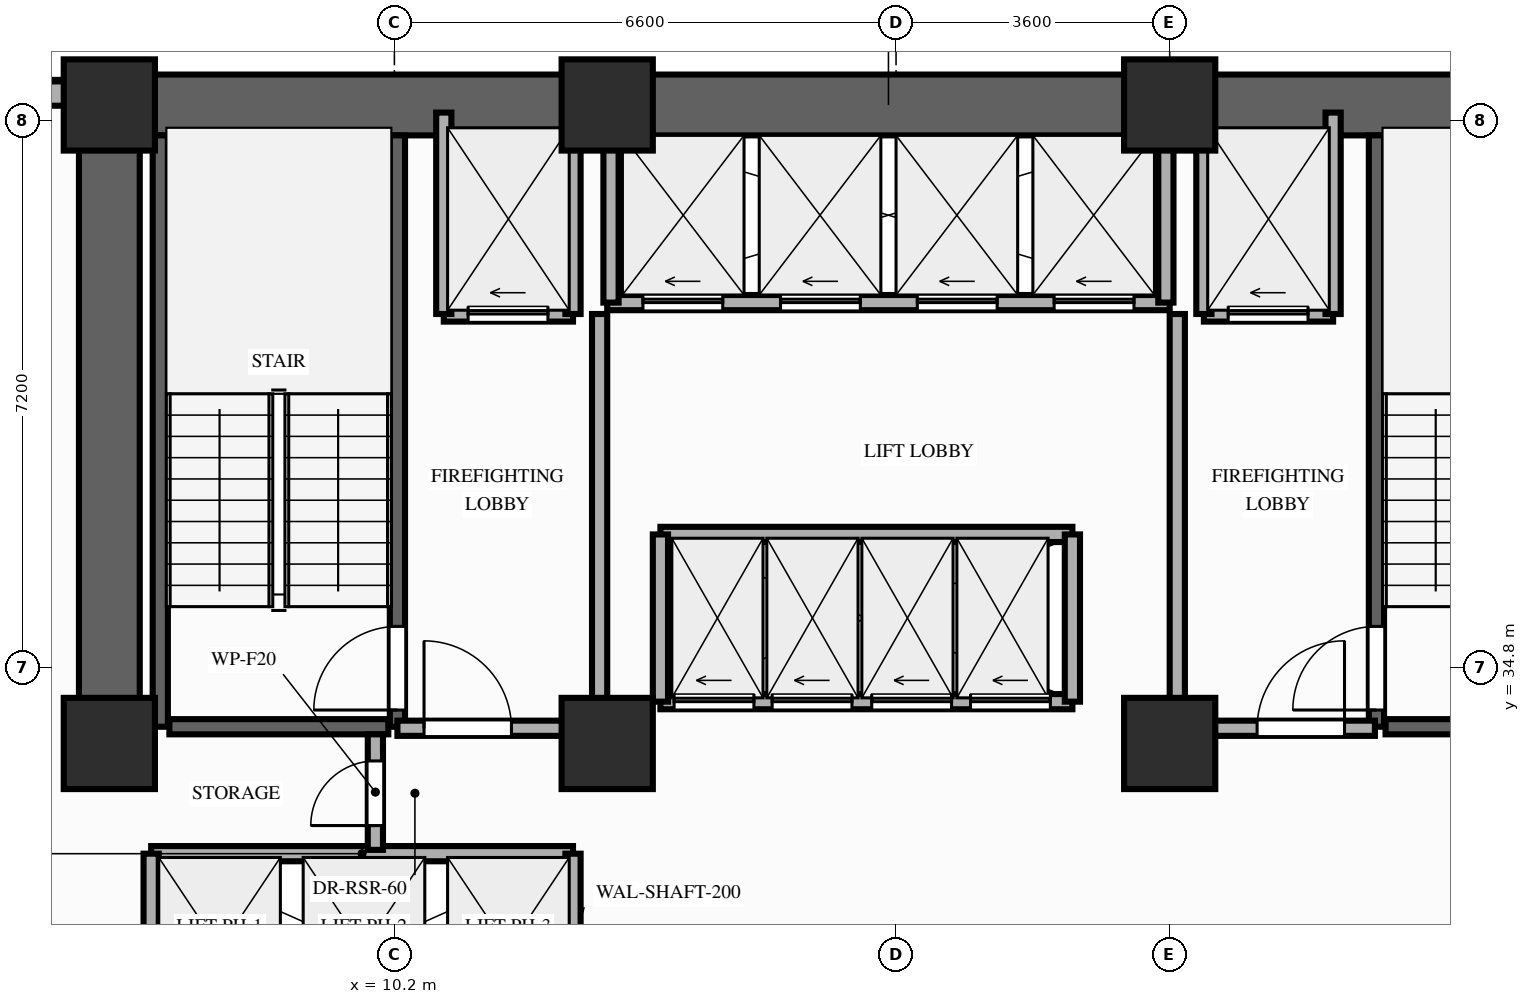
"""IFC4 building model, lengths in metres.
Left out: names, types, materials, properties, quantities, classifications, styles, units other than length and angle.
Written with IfcOpenShell. Run it as: python <this file> out.ifc"""

import sys

from ifc_helpers import new_model, si_unit, direction, frame, frame_2d, origin, origin_2d, place, context, subcontext, project, spatial, rectangle, extrude, element, fill, save


model = new_model("IFC4")
c1 = context("Model", 3, precision=1e-05, world=origin(), true_north=direction((0.0, 1.0)))
c2 = subcontext(c1, "Body", "Model", "MODEL_VIEW")
j1 = project(units=[si_unit("LENGTHUNIT", "METRE"), si_unit("PLANEANGLEUNIT", "RADIAN")], contexts=[c1])
p1 = place(None, origin())
s1 = spatial("IfcSite", under=j1, at=p1, CompositionType="ELEMENT")
p2 = place(p1, origin())
s2 = spatial("IfcBuilding", under=s1, at=p2, CompositionType="ELEMENT")
p3 = place(p2, frame((0.0, 0.0, 75.6)))
s3 = spatial("IfcBuildingStorey", under=s2, at=p3, CompositionType="ELEMENT", Elevation=75.6)
for number, where, z_axis, x_axis in (
    (1, (6.45, 33.8, 0.0), (0.0, 0.0, 1.0), (1.0, 0.0, 0.0)),
    (2, (13.0, 33.8, 0.0), (0.0, 0.0, 1.0), (1.0, 0.0, 0.0)),
    (3, (20.4, 33.8, 0.0), (0.0, 0.0, 1.0), (1.0, 0.0, 0.0)),
    (4, (6.45, 42.2, 0.0), (0.0, 0.0, 1.0), (1.0, 0.0, 0.0)),
    (5, (13.0, 42.2, 0.0), (0.0, 0.0, 1.0), (1.0, 0.0, 0.0)),
    (6, (20.4, 42.2, 0.0), (0.0, 0.0, 1.0), (1.0, 0.0, 0.0)),
):
    element("IfcColumn", number, at=place(p3, frame(where, z_axis=z_axis, x_axis=x_axis)), inside=s3, PredefinedType="COLUMN", context=c2, shape_type="SweptSolid", body=[
        extrude(rectangle(XDim=1.2, YDim=1.2, at=origin_2d()), origin(), (0.0, 0.0, 1.0), 3.8),
    ])
p4 = place(p3, frame((6.0, 42.35, 0.0), z_axis=(0.0, 0.0, 1.0), x_axis=(-1.0, 0.0, 0.0)))
e7 = element("IfcWall", 7, at=p4, inside=s3, PredefinedType="STANDARD", context=c2, shape_type="SweptSolid", body=[
    extrude(rectangle(XDim=2.0, YDim=0.32, at=frame_2d((1.0, 0.0))), origin(), (0.0, 0.0, 1.0), 3.56),
])
p5 = place(p3, frame((6.45, 42.2, 0.0), z_axis=(0.0, 0.0, 1.0), x_axis=(1.0, 0.0, 0.0)))
e8 = element("IfcWall", 8, at=p5, inside=s3, PredefinedType="SHEAR", context=c2, shape_type="SweptSolid", body=[
    extrude(rectangle(XDim=20.45, YDim=0.8, at=frame_2d((10.225, 0.0))), origin(), (0.0, 0.0, 1.0), 3.56),
])
p6 = place(p3, frame((6.45, 33.8, 0.0), z_axis=(0.0, 0.0, 1.0), x_axis=(0.0, 1.0, 0.0)))
e9 = element("IfcWall", 9, at=p6, inside=s3, PredefinedType="SHEAR", context=c2, shape_type="SweptSolid", body=[
    extrude(rectangle(XDim=7.95, YDim=0.8, at=frame_2d((3.975, 0.0))), origin(), (0.0, 0.0, 1.0), 3.56),
])
p7 = place(p3, frame((7.12, 34.02, 0.0), z_axis=(0.0, 0.0, 1.0), x_axis=(0.0, 1.0, 0.0)))
e10 = element("IfcWall", 10, at=p7, inside=s3, PredefinedType="SHEAR", context=c2, shape_type="SweptSolid", body=[
    extrude(rectangle(XDim=7.78, YDim=0.2, at=frame_2d((3.89, 0.0))), origin(), (0.0, 0.0, 1.0), 3.56),
])
p8 = place(p3, frame((10.24, 34.02, 0.0), z_axis=(0.0, 0.0, 1.0), x_axis=(0.0, 1.0, 0.0)))
e11 = element("IfcWall", 11, at=p8, inside=s3, PredefinedType="SHEAR", context=c2, shape_type="SweptSolid", body=[
    extrude(rectangle(XDim=7.78, YDim=0.2, at=frame_2d((3.89, 0.0))), origin(), (0.0, 0.0, 1.0), 3.56),
])
p9 = place(p8, frame((0.22, 0.0, 0.0)))
e12 = element("IfcOpeningElement", 12, at=p9, cuts=e11, PredefinedType="OPENING", context=c2, shape_type="SweptSolid", body=[
    extrude(rectangle(XDim=1.1, YDim=2.15, at=frame_2d((0.55, 1.075))), frame((0.0, 0.11, 0.0), z_axis=(0.0, -1.0, 0.0), x_axis=(1.0, 0.0, 0.0)), (0.0, 0.0, 1.0), 0.22),
])
p10 = place(p3, frame((7.24, 34.02, 0.0), z_axis=(0.0, 0.0, 1.0), x_axis=(1.0, 0.0, 0.0)))
e13 = element("IfcWall", 13, at=p10, inside=s3, PredefinedType="SHEAR", context=c2, shape_type="SweptSolid", body=[
    extrude(rectangle(XDim=2.88, YDim=0.2, at=frame_2d((1.44, 0.0))), origin(), (0.0, 0.0, 1.0), 3.56),
])
p11 = place(p3, frame((23.12, 34.02, 0.0), z_axis=(0.0, 0.0, 1.0), x_axis=(0.0, 1.0, 0.0)))
e14 = element("IfcWall", 14, at=p11, inside=s3, PredefinedType="SHEAR", context=c2, shape_type="SweptSolid", body=[
    extrude(rectangle(XDim=7.78, YDim=0.2, at=frame_2d((3.89, 0.0))), origin(), (0.0, 0.0, 1.0), 3.56),
])
p12 = place(p11, frame((0.22, 0.0, 0.0)))
e15 = element("IfcOpeningElement", 15, at=p12, cuts=e14, PredefinedType="OPENING", context=c2, shape_type="SweptSolid", body=[
    extrude(rectangle(XDim=1.1, YDim=2.15, at=frame_2d((0.55, 1.075))), frame((0.0, 0.11, 0.0), z_axis=(0.0, -1.0, 0.0), x_axis=(1.0, 0.0, 0.0)), (0.0, 0.0, 1.0), 0.22),
])
p13 = place(p3, frame((23.24, 34.02, 0.0), z_axis=(0.0, 0.0, 1.0), x_axis=(1.0, 0.0, 0.0)))
e16 = element("IfcWall", 16, at=p13, inside=s3, PredefinedType="SHEAR", context=c2, shape_type="SweptSolid", body=[
    extrude(rectangle(XDim=2.88, YDim=0.2, at=frame_2d((1.44, 0.0))), origin(), (0.0, 0.0, 1.0), 3.56),
])
p14 = place(p3, frame((7.0, 32.35, 0.0), z_axis=(0.0, 0.0, 1.0), x_axis=(1.0, 0.0, 0.0)))
e17 = element("IfcWall", 17, at=p14, inside=s3, PredefinedType="MOVABLE", context=c2, shape_type="SweptSolid", body=[
    extrude(rectangle(XDim=5.55, YDim=0.2, at=frame_2d((2.775, 0.0))), origin(), (0.0, 0.0, 1.0), 3.56),
])
for number, where, z_axis, x_axis in (
    (18, (7.0, 29.85, 0.0), (0.0, 0.0, 1.0), (0.0, 1.0, 0.0)),
    (19, (12.55, 29.85, 0.0), (0.0, 0.0, 1.0), (0.0, 1.0, 0.0)),
):
    element("IfcWall", number, at=place(p3, frame(where, z_axis=z_axis, x_axis=x_axis)), inside=s3, PredefinedType="MOVABLE", context=c2, shape_type="SweptSolid", body=[
        extrude(rectangle(XDim=2.5, YDim=0.2, at=frame_2d((1.25, 0.0))), origin(), (0.0, 0.0, 1.0), 3.56),
    ])
p15 = place(p3, frame((10.85, 39.45, 0.0), z_axis=(0.0, 0.0, 1.0), x_axis=(1.0, 0.0, 0.0)))
e20 = element("IfcWall", 20, at=p15, inside=s3, PredefinedType="MOVABLE", context=c2, shape_type="SweptSolid", body=[
    extrude(rectangle(XDim=1.7, YDim=0.2, at=frame_2d((0.85, 0.0))), origin(), (0.0, 0.0, 1.0), 3.56),
])
p16 = place(p15, frame((0.32, 0.0, 0.0)))
e21 = element("IfcOpeningElement", 21, at=p16, cuts=e20, PredefinedType="OPENING", context=c2, shape_type="SweptSolid", body=[
    extrude(rectangle(XDim=1.05, YDim=2.15, at=frame_2d((0.525, 1.075))), frame((0.0, 0.11, 0.0), z_axis=(0.0, -1.0, 0.0), x_axis=(1.0, 0.0, 0.0)), (0.0, 0.0, 1.0), 0.22),
])
p17 = place(p3, frame((20.85, 39.45, 0.0), z_axis=(0.0, 0.0, 1.0), x_axis=(1.0, 0.0, 0.0)))
e22 = element("IfcWall", 22, at=p17, inside=s3, PredefinedType="MOVABLE", context=c2, shape_type="SweptSolid", body=[
    extrude(rectangle(XDim=1.7, YDim=0.2, at=frame_2d((0.85, 0.0))), origin(), (0.0, 0.0, 1.0), 3.56),
])
p18 = place(p17, frame((0.32, 0.0, 0.0)))
e23 = element("IfcOpeningElement", 23, at=p18, cuts=e22, PredefinedType="OPENING", context=c2, shape_type="SweptSolid", body=[
    extrude(rectangle(XDim=1.05, YDim=2.15, at=frame_2d((0.525, 1.075))), frame((0.0, 0.11, 0.0), z_axis=(0.0, -1.0, 0.0), x_axis=(1.0, 0.0, 0.0)), (0.0, 0.0, 1.0), 0.22),
])
for number, where, z_axis, x_axis in (
    (24, (10.85, 39.45, 0.0), (0.0, 0.0, 1.0), (0.0, 1.0, 0.0)),
    (25, (12.55, 39.45, 0.0), (0.0, 0.0, 1.0), (0.0, 1.0, 0.0)),
):
    element("IfcWall", number, at=place(p3, frame(where, z_axis=z_axis, x_axis=x_axis)), inside=s3, PredefinedType="MOVABLE", context=c2, shape_type="SweptSolid", body=[
        extrude(rectangle(XDim=2.65, YDim=0.2, at=frame_2d((1.325, 0.0))), origin(), (0.0, 0.0, 1.0), 2.95),
    ])
p19 = place(p3, frame((12.9, 34.0, 0.0), z_axis=(0.0, 0.0, 1.0), x_axis=(0.0, 1.0, 0.0)))
e26 = element("IfcWall", 26, at=p19, inside=s3, PredefinedType="PARTITIONING", context=c2, shape_type="SweptSolid", body=[
    extrude(rectangle(XDim=5.45, YDim=0.2, at=frame_2d((2.725, 0.0))), origin(), (0.0, 0.0, 1.0), 2.95),
])
p20 = place(p3, frame((10.24, 34.0, 0.0), z_axis=(0.0, 0.0, 1.0), x_axis=(1.0, 0.0, 0.0)))
e27 = element("IfcWall", 27, at=p20, inside=s3, PredefinedType="PARTITIONING", context=c2, shape_type="SweptSolid", body=[
    extrude(rectangle(XDim=2.66, YDim=0.2, at=frame_2d((1.33, 0.0))), origin(), (0.0, 0.0, 1.0), 2.95),
])
p21 = place(p20, frame((0.35, 0.0, 0.0)))
e28 = element("IfcOpeningElement", 28, at=p21, cuts=e27, PredefinedType="OPENING", context=c2, shape_type="SweptSolid", body=[
    extrude(rectangle(XDim=1.15, YDim=2.15, at=frame_2d((0.575, 1.075))), frame((0.0, 0.11, 0.0), z_axis=(0.0, -1.0, 0.0), x_axis=(1.0, 0.0, 0.0)), (0.0, 0.0, 1.0), 0.22),
])
for number, where, z_axis, x_axis in (
    (29, (20.85, 39.45, 0.0), (0.0, 0.0, 1.0), (0.0, 1.0, 0.0)),
    (30, (22.55, 39.45, 0.0), (0.0, 0.0, 1.0), (0.0, 1.0, 0.0)),
):
    element("IfcWall", number, at=place(p3, frame(where, z_axis=z_axis, x_axis=x_axis)), inside=s3, PredefinedType="MOVABLE", context=c2, shape_type="SweptSolid", body=[
        extrude(rectangle(XDim=2.65, YDim=0.2, at=frame_2d((1.325, 0.0))), origin(), (0.0, 0.0, 1.0), 2.95),
    ])
p22 = place(p3, frame((20.5, 34.0, 0.0), z_axis=(0.0, 0.0, 1.0), x_axis=(0.0, 1.0, 0.0)))
e31 = element("IfcWall", 31, at=p22, inside=s3, PredefinedType="PARTITIONING", context=c2, shape_type="SweptSolid", body=[
    extrude(rectangle(XDim=5.45, YDim=0.2, at=frame_2d((2.725, 0.0))), origin(), (0.0, 0.0, 1.0), 2.95),
])
p23 = place(p3, frame((20.5, 34.0, 0.0), z_axis=(0.0, 0.0, 1.0), x_axis=(1.0, 0.0, 0.0)))
e32 = element("IfcWall", 32, at=p23, inside=s3, PredefinedType="PARTITIONING", context=c2, shape_type="SweptSolid", body=[
    extrude(rectangle(XDim=2.6, YDim=0.2, at=frame_2d((1.3, 0.0))), origin(), (0.0, 0.0, 1.0), 2.95),
])
p24 = place(p23, frame((1.05, 0.0, 0.0)))
e33 = element("IfcOpeningElement", 33, at=p24, cuts=e32, PredefinedType="OPENING", context=c2, shape_type="SweptSolid", body=[
    extrude(rectangle(XDim=1.15, YDim=2.15, at=frame_2d((0.575, 1.075))), frame((0.0, 0.11, 0.0), z_axis=(0.0, -1.0, 0.0), x_axis=(1.0, 0.0, 0.0)), (0.0, 0.0, 1.0), 0.22),
])
p25 = place(p3, frame((9.95, 32.4, 0.0), z_axis=(0.0, 0.0, 1.0), x_axis=(0.0, 1.0, 0.0)))
e34 = element("IfcWall", 34, at=p25, inside=s3, PredefinedType="PARTITIONING", context=c2, shape_type="SweptSolid", body=[
    extrude(rectangle(XDim=1.52, YDim=0.2, at=frame_2d((0.76, 0.0))), origin(), (0.0, 0.0, 1.0), 2.95),
])
p26 = place(p25, frame((0.32, 0.0, 0.0)))
e35 = element("IfcOpeningElement", 35, at=p26, cuts=e34, PredefinedType="OPENING", context=c2, shape_type="SweptSolid", body=[
    extrude(rectangle(XDim=0.85, YDim=2.05, at=frame_2d((0.425, 1.025))), frame((0.0, 0.11, 0.0), z_axis=(0.0, -1.0, 0.0), x_axis=(1.0, 0.0, 0.0)), (0.0, 0.0, 1.0), 0.22),
])
p27 = place(p3, frame((13.0, 39.6, 0.0), z_axis=(0.0, 0.0, 1.0), x_axis=(1.0, 0.0, 0.0)))
e36 = element("IfcWall", 36, at=p27, inside=s3, PredefinedType="MOVABLE", context=c2, shape_type="SweptSolid", body=[
    extrude(rectangle(XDim=7.4, YDim=0.2, at=frame_2d((3.7, 0.0))), origin(), (0.0, 0.0, 1.0), 3.56),
])
p28 = place(p27, frame((0.47, 0.0, 0.0)))
e37 = element("IfcOpeningElement", 37, at=p28, cuts=e36, PredefinedType="OPENING", context=c2, shape_type="SweptSolid", body=[
    extrude(rectangle(XDim=1.05, YDim=2.15, at=frame_2d((0.525, 1.075))), frame((0.0, 0.11, 0.0), z_axis=(0.0, -1.0, 0.0), x_axis=(1.0, 0.0, 0.0)), (0.0, 0.0, 1.0), 0.22),
])
p29 = place(p27, frame((2.28, 0.0, 0.0)))
e38 = element("IfcOpeningElement", 38, at=p29, cuts=e36, PredefinedType="OPENING", context=c2, shape_type="SweptSolid", body=[
    extrude(rectangle(XDim=1.05, YDim=2.15, at=frame_2d((0.525, 1.075))), frame((0.0, 0.11, 0.0), z_axis=(0.0, -1.0, 0.0), x_axis=(1.0, 0.0, 0.0)), (0.0, 0.0, 1.0), 0.22),
])
p30 = place(p27, frame((4.08, 0.0, 0.0)))
e39 = element("IfcOpeningElement", 39, at=p30, cuts=e36, PredefinedType="OPENING", context=c2, shape_type="SweptSolid", body=[
    extrude(rectangle(XDim=1.05, YDim=2.15, at=frame_2d((0.525, 1.075))), frame((0.0, 0.11, 0.0), z_axis=(0.0, -1.0, 0.0), x_axis=(1.0, 0.0, 0.0)), (0.0, 0.0, 1.0), 0.22),
])
p31 = place(p27, frame((5.88, 0.0, 0.0)))
e40 = element("IfcOpeningElement", 40, at=p31, cuts=e36, PredefinedType="OPENING", context=c2, shape_type="SweptSolid", body=[
    extrude(rectangle(XDim=1.05, YDim=2.15, at=frame_2d((0.525, 1.075))), frame((0.0, 0.11, 0.0), z_axis=(0.0, -1.0, 0.0), x_axis=(1.0, 0.0, 0.0)), (0.0, 0.0, 1.0), 0.22),
])
for number, where, z_axis, x_axis in (
    (41, (13.05, 39.6, 0.0), (0.0, 0.0, 1.0), (0.0, 1.0, 0.0)),
    (42, (20.35, 39.6, 0.0), (0.0, 0.0, 1.0), (0.0, 1.0, 0.0)),
):
    element("IfcWall", number, at=place(p3, frame(where, z_axis=z_axis, x_axis=x_axis)), inside=s3, PredefinedType="MOVABLE", context=c2, shape_type="SweptSolid", body=[
        extrude(rectangle(XDim=2.18, YDim=0.2, at=frame_2d((1.09, 0.0))), origin(), (0.0, 0.0, 1.0), 3.56),
    ])
p32 = place(p3, frame((13.7, 34.35, 0.0), z_axis=(0.0, 0.0, 1.0), x_axis=(1.0, 0.0, 0.0)))
e43 = element("IfcWall", 43, at=p32, inside=s3, PredefinedType="MOVABLE", context=c2, shape_type="SweptSolid", body=[
    extrude(rectangle(XDim=5.42, YDim=0.2, at=frame_2d((2.71, 0.0))), origin(), (0.0, 0.0, 1.0), 3.56),
])
p33 = place(p32, frame((0.18, 0.0, 0.0)))
e44 = element("IfcOpeningElement", 44, at=p33, cuts=e43, PredefinedType="OPENING", context=c2, shape_type="SweptSolid", body=[
    extrude(rectangle(XDim=1.05, YDim=2.15, at=frame_2d((0.525, 1.075))), frame((0.0, 0.11, 0.0), z_axis=(0.0, -1.0, 0.0), x_axis=(1.0, 0.0, 0.0)), (0.0, 0.0, 1.0), 0.22),
])
p34 = place(p32, frame((1.47, 0.0, 0.0)))
e45 = element("IfcOpeningElement", 45, at=p34, cuts=e43, PredefinedType="OPENING", context=c2, shape_type="SweptSolid", body=[
    extrude(rectangle(XDim=1.05, YDim=2.15, at=frame_2d((0.525, 1.075))), frame((0.0, 0.11, 0.0), z_axis=(0.0, -1.0, 0.0), x_axis=(1.0, 0.0, 0.0)), (0.0, 0.0, 1.0), 0.22),
])
p35 = place(p32, frame((2.78, 0.0, 0.0)))
e46 = element("IfcOpeningElement", 46, at=p35, cuts=e43, PredefinedType="OPENING", context=c2, shape_type="SweptSolid", body=[
    extrude(rectangle(XDim=1.05, YDim=2.15, at=frame_2d((0.525, 1.075))), frame((0.0, 0.11, 0.0), z_axis=(0.0, -1.0, 0.0), x_axis=(1.0, 0.0, 0.0)), (0.0, 0.0, 1.0), 0.22),
])
p36 = place(p32, frame((4.08, 0.0, 0.0)))
e47 = element("IfcOpeningElement", 47, at=p36, cuts=e43, PredefinedType="OPENING", context=c2, shape_type="SweptSolid", body=[
    extrude(rectangle(XDim=1.05, YDim=2.15, at=frame_2d((0.525, 1.075))), frame((0.0, 0.11, 0.0), z_axis=(0.0, -1.0, 0.0), x_axis=(1.0, 0.0, 0.0)), (0.0, 0.0, 1.0), 0.22),
])
p37 = place(p3, frame((13.7, 36.55, 0.0), z_axis=(0.0, 0.0, 1.0), x_axis=(1.0, 0.0, 0.0)))
e48 = element("IfcWall", 48, at=p37, inside=s3, PredefinedType="MOVABLE", context=c2, shape_type="SweptSolid", body=[
    extrude(rectangle(XDim=5.42, YDim=0.2, at=frame_2d((2.71, 0.0))), origin(), (0.0, 0.0, 1.0), 3.56),
])
for number, where, z_axis, x_axis in (
    (49, (13.7, 34.35, 0.0), (0.0, 0.0, 1.0), (0.0, 1.0, 0.0)),
    (50, (19.12, 34.35, 0.0), (0.0, 0.0, 1.0), (0.0, 1.0, 0.0)),
):
    element("IfcWall", number, at=place(p3, frame(where, z_axis=z_axis, x_axis=x_axis)), inside=s3, PredefinedType="MOVABLE", context=c2, shape_type="SweptSolid", body=[
        extrude(rectangle(XDim=2.2, YDim=0.2, at=frame_2d((1.1, 0.0))), origin(), (0.0, 0.0, 1.0), 3.56),
    ])
p38 = place(p9, origin())
e51 = element("IfcDoor", 51, at=p38, inside=s3, OperationType="SINGLE_SWING_LEFT", PredefinedType="DOOR", context=c2, shape_type="SweptSolid", body=[
    extrude(rectangle(XDim=1.1, YDim=2.15, at=frame_2d((0.55, 1.075))), frame((0.0, 0.025, 0.0), z_axis=(0.0, -1.0, 0.0), x_axis=(1.0, 0.0, 0.0)), (0.0, 0.0, 1.0), 0.05),
])
fill(e12, e51)
p39 = place(p12, origin())
e52 = element("IfcDoor", 52, at=p39, inside=s3, OperationType="SINGLE_SWING_LEFT", PredefinedType="DOOR", context=c2, shape_type="SweptSolid", body=[
    extrude(rectangle(XDim=1.1, YDim=2.15, at=frame_2d((0.55, 1.075))), frame((0.0, 0.025, 0.0), z_axis=(0.0, -1.0, 0.0), x_axis=(1.0, 0.0, 0.0)), (0.0, 0.0, 1.0), 0.05),
])
fill(e15, e52)
p40 = place(p16, origin())
e53 = element("IfcDoor", 53, at=p40, inside=s3, OperationType="SLIDING_TO_LEFT", PredefinedType="DOOR", context=c2, shape_type="SweptSolid", body=[
    extrude(rectangle(XDim=1.05, YDim=2.15, at=frame_2d((0.525, 1.075))), frame((0.0, 0.025, 0.0), z_axis=(0.0, -1.0, 0.0), x_axis=(1.0, 0.0, 0.0)), (0.0, 0.0, 1.0), 0.05),
])
fill(e21, e53)
p41 = place(p18, origin())
e54 = element("IfcDoor", 54, at=p41, inside=s3, OperationType="SLIDING_TO_LEFT", PredefinedType="DOOR", context=c2, shape_type="SweptSolid", body=[
    extrude(rectangle(XDim=1.05, YDim=2.15, at=frame_2d((0.525, 1.075))), frame((0.0, 0.025, 0.0), z_axis=(0.0, -1.0, 0.0), x_axis=(1.0, 0.0, 0.0)), (0.0, 0.0, 1.0), 0.05),
])
fill(e23, e54)
p42 = place(p21, origin())
e55 = element("IfcDoor", 55, at=p42, inside=s3, OperationType="SINGLE_SWING_LEFT", PredefinedType="DOOR", context=c2, shape_type="SweptSolid", body=[
    extrude(rectangle(XDim=1.15, YDim=2.15, at=frame_2d((0.575, 1.075))), frame((0.0, 0.025, 0.0), z_axis=(0.0, -1.0, 0.0), x_axis=(1.0, 0.0, 0.0)), (0.0, 0.0, 1.0), 0.05),
])
fill(e28, e55)
p43 = place(p24, origin())
e56 = element("IfcDoor", 56, at=p43, inside=s3, OperationType="SINGLE_SWING_RIGHT", PredefinedType="DOOR", context=c2, shape_type="SweptSolid", body=[
    extrude(rectangle(XDim=1.15, YDim=2.15, at=frame_2d((0.575, 1.075))), frame((0.0, 0.025, 0.0), z_axis=(0.0, -1.0, 0.0), x_axis=(1.0, 0.0, 0.0)), (0.0, 0.0, 1.0), 0.05),
])
fill(e33, e56)
p44 = place(p26, origin())
e57 = element("IfcDoor", 57, at=p44, inside=s3, OperationType="SINGLE_SWING_LEFT", PredefinedType="DOOR", context=c2, shape_type="SweptSolid", body=[
    extrude(rectangle(XDim=0.85, YDim=2.05, at=frame_2d((0.425, 1.025))), frame((0.0, 0.025, 0.0), z_axis=(0.0, -1.0, 0.0), x_axis=(1.0, 0.0, 0.0)), (0.0, 0.0, 1.0), 0.05),
])
fill(e35, e57)
p45 = place(p28, origin())
e58 = element("IfcDoor", 58, at=p45, inside=s3, OperationType="SLIDING_TO_LEFT", PredefinedType="DOOR", context=c2, shape_type="SweptSolid", body=[
    extrude(rectangle(XDim=1.05, YDim=2.15, at=frame_2d((0.525, 1.075))), frame((0.0, 0.025, 0.0), z_axis=(0.0, -1.0, 0.0), x_axis=(1.0, 0.0, 0.0)), (0.0, 0.0, 1.0), 0.05),
])
fill(e37, e58)
p46 = place(p29, origin())
e59 = element("IfcDoor", 59, at=p46, inside=s3, OperationType="SLIDING_TO_LEFT", PredefinedType="DOOR", context=c2, shape_type="SweptSolid", body=[
    extrude(rectangle(XDim=1.05, YDim=2.15, at=frame_2d((0.525, 1.075))), frame((0.0, 0.025, 0.0), z_axis=(0.0, -1.0, 0.0), x_axis=(1.0, 0.0, 0.0)), (0.0, 0.0, 1.0), 0.05),
])
fill(e38, e59)
p47 = place(p30, origin())
e60 = element("IfcDoor", 60, at=p47, inside=s3, OperationType="SLIDING_TO_LEFT", PredefinedType="DOOR", context=c2, shape_type="SweptSolid", body=[
    extrude(rectangle(XDim=1.05, YDim=2.15, at=frame_2d((0.525, 1.075))), frame((0.0, 0.025, 0.0), z_axis=(0.0, -1.0, 0.0), x_axis=(1.0, 0.0, 0.0)), (0.0, 0.0, 1.0), 0.05),
])
fill(e39, e60)
p48 = place(p31, origin())
e61 = element("IfcDoor", 61, at=p48, inside=s3, OperationType="SLIDING_TO_LEFT", PredefinedType="DOOR", context=c2, shape_type="SweptSolid", body=[
    extrude(rectangle(XDim=1.05, YDim=2.15, at=frame_2d((0.525, 1.075))), frame((0.0, 0.025, 0.0), z_axis=(0.0, -1.0, 0.0), x_axis=(1.0, 0.0, 0.0)), (0.0, 0.0, 1.0), 0.05),
])
fill(e40, e61)
p49 = place(p33, origin())
e62 = element("IfcDoor", 62, at=p49, inside=s3, OperationType="SLIDING_TO_LEFT", PredefinedType="DOOR", context=c2, shape_type="SweptSolid", body=[
    extrude(rectangle(XDim=1.05, YDim=2.15, at=frame_2d((0.525, 1.075))), frame((0.0, 0.025, 0.0), z_axis=(0.0, -1.0, 0.0), x_axis=(1.0, 0.0, 0.0)), (0.0, 0.0, 1.0), 0.05),
])
fill(e44, e62)
p50 = place(p34, origin())
e63 = element("IfcDoor", 63, at=p50, inside=s3, OperationType="SLIDING_TO_LEFT", PredefinedType="DOOR", context=c2, shape_type="SweptSolid", body=[
    extrude(rectangle(XDim=1.05, YDim=2.15, at=frame_2d((0.525, 1.075))), frame((0.0, 0.025, 0.0), z_axis=(0.0, -1.0, 0.0), x_axis=(1.0, 0.0, 0.0)), (0.0, 0.0, 1.0), 0.05),
])
fill(e45, e63)
p51 = place(p35, origin())
e64 = element("IfcDoor", 64, at=p51, inside=s3, OperationType="SLIDING_TO_LEFT", PredefinedType="DOOR", context=c2, shape_type="SweptSolid", body=[
    extrude(rectangle(XDim=1.05, YDim=2.15, at=frame_2d((0.525, 1.075))), frame((0.0, 0.025, 0.0), z_axis=(0.0, -1.0, 0.0), x_axis=(1.0, 0.0, 0.0)), (0.0, 0.0, 1.0), 0.05),
])
fill(e46, e64)
p52 = place(p36, origin())
e65 = element("IfcDoor", 65, at=p52, inside=s3, OperationType="SLIDING_TO_LEFT", PredefinedType="DOOR", context=c2, shape_type="SweptSolid", body=[
    extrude(rectangle(XDim=1.05, YDim=2.15, at=frame_2d((0.525, 1.075))), frame((0.0, 0.025, 0.0), z_axis=(0.0, -1.0, 0.0), x_axis=(1.0, 0.0, 0.0)), (0.0, 0.0, 1.0), 0.05),
])
fill(e47, e65)
save(model, sys.argv[1])
